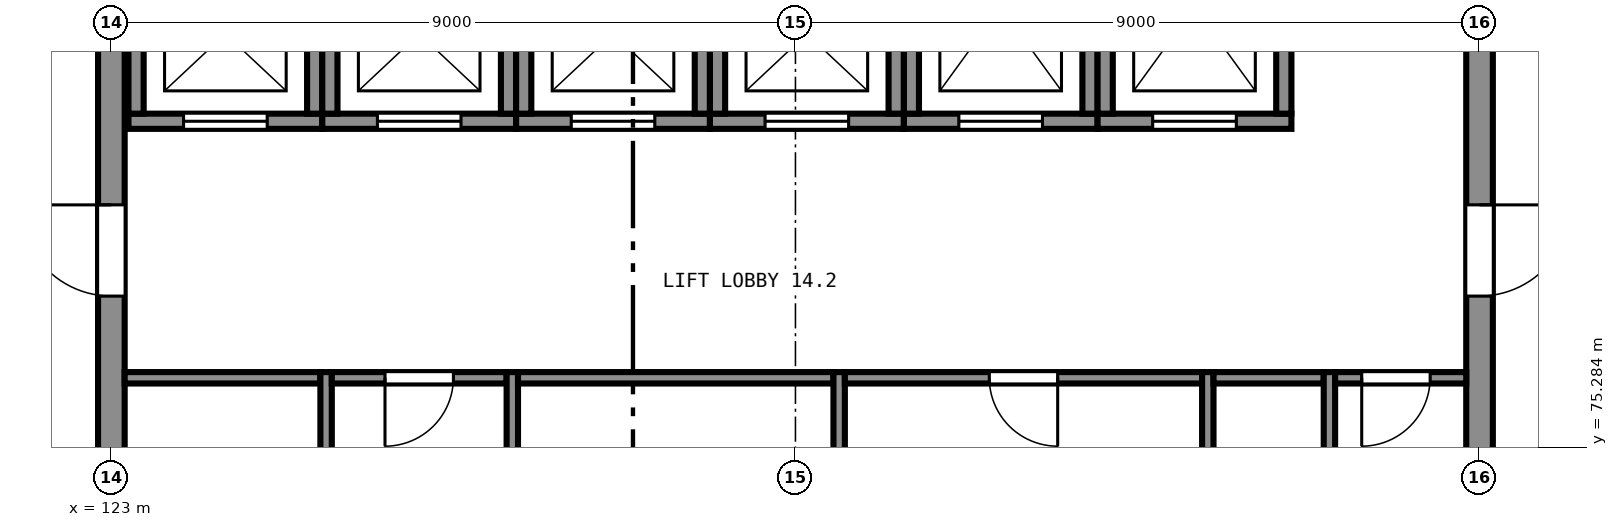
"""IFC4 building model, lengths in metres.
Left out: names, types, materials, properties, quantities, classifications, styles, units other than length and angle.
Written with IfcOpenShell. Run it as: python <this file> out.ifc"""

import sys

from ifc_helpers import new_model, si_unit, direction, frame, frame_2d, origin, place, context, subcontext, project, spatial, rectangle, extrude, element, fill, save


model = new_model("IFC4")
c1 = context("Model", 3, precision=1e-05, world=origin(), true_north=direction((0.0, 1.0)))
c2 = subcontext(c1, "Body", "Model", "MODEL_VIEW")
j1 = project(units=[si_unit("LENGTHUNIT", "METRE"), si_unit("PLANEANGLEUNIT", "RADIAN")], contexts=[c1])
p1 = place(None, origin())
s1 = spatial("IfcSite", under=j1, at=p1, CompositionType="ELEMENT")
p2 = place(p1, origin())
s2 = spatial("IfcBuilding", under=s1, at=p2, CompositionType="ELEMENT")
p3 = place(p2, frame((0.0, 0.0, 57.5)))
s3 = spatial("IfcBuildingStorey", under=s2, at=p3, CompositionType="ELEMENT", Elevation=57.5)
p4 = place(p3, frame((141.0, 65.175, 0.0), z_axis=(0.0, 0.0, 1.0), x_axis=(0.0, 1.0, 0.0)))
e1 = element("IfcWall", 1, at=p4, inside=s3, PredefinedType="SHEAR", context=c2, shape_type="SweptSolid", body=[
    extrude(rectangle(XDim=17.65, YDim=0.35, at=frame_2d((8.825, 0.0))), origin(), (0.0, 0.0, 1.0), 4.0),
])
p5 = place(p4, frame((4.35, 0.0, 0.0)))
e2 = element("IfcOpeningElement", 2, at=p5, cuts=e1, PredefinedType="OPENING", context=c2, shape_type="SweptSolid", body=[
    extrude(rectangle(XDim=1.2, YDim=2.1, at=frame_2d((0.6, 1.05))), frame((0.0, 0.185, 0.0), z_axis=(0.0, -1.0, 0.0), x_axis=(1.0, 0.0, 0.0)), (0.0, 0.0, 1.0), 0.37),
])
p6 = place(p4, frame((12.1, 0.0, 0.0)))
e3 = element("IfcOpeningElement", 3, at=p6, cuts=e1, PredefinedType="OPENING", context=c2, shape_type="SweptSolid", body=[
    extrude(rectangle(XDim=1.2, YDim=2.1, at=frame_2d((0.6, 1.05))), frame((0.0, 0.185, 0.0), z_axis=(0.0, -1.0, 0.0), x_axis=(1.0, 0.0, 0.0)), (0.0, 0.0, 1.0), 0.37),
])
p7 = place(p3, frame((123.0, 82.825, 0.0), z_axis=(0.0, 0.0, 1.0), x_axis=(0.0, -1.0, 0.0)))
e4 = element("IfcWall", 4, at=p7, inside=s3, PredefinedType="SHEAR", context=c2, shape_type="SweptSolid", body=[
    extrude(rectangle(XDim=17.65, YDim=0.35, at=frame_2d((8.825, 0.0))), origin(), (0.0, 0.0, 1.0), 4.0),
])
p8 = place(p7, frame((12.1, 0.0, 0.0)))
e5 = element("IfcOpeningElement", 5, at=p8, cuts=e4, PredefinedType="OPENING", context=c2, shape_type="SweptSolid", body=[
    extrude(rectangle(XDim=1.2, YDim=2.1, at=frame_2d((0.6, 1.05))), frame((0.0, 0.185, 0.0), z_axis=(0.0, -1.0, 0.0), x_axis=(1.0, 0.0, 0.0)), (0.0, 0.0, 1.0), 0.37),
])
p9 = place(p7, frame((4.35, 0.0, 0.0)))
e6 = element("IfcOpeningElement", 6, at=p9, cuts=e4, PredefinedType="OPENING", context=c2, shape_type="SweptSolid", body=[
    extrude(rectangle(XDim=1.2, YDim=2.1, at=frame_2d((0.6, 1.05))), frame((0.0, 0.185, 0.0), z_axis=(0.0, -1.0, 0.0), x_axis=(1.0, 0.0, 0.0)), (0.0, 0.0, 1.0), 0.37),
])
p10 = place(p3, frame((123.225, 79.575, 0.0), z_axis=(0.0, 0.0, 1.0), x_axis=(1.0, 0.0, 0.0)))
e7 = element("IfcWall", 7, at=p10, inside=s3, PredefinedType="SHEAR", context=c2, shape_type="SweptSolid", body=[
    extrude(rectangle(XDim=2.55, YDim=0.2, at=frame_2d((1.275, 0.0))), origin(), (0.0, 0.0, 1.0), 4.0),
])
p11 = place(p10, frame((0.725, 0.0, 0.0)))
e8 = element("IfcOpeningElement", 8, at=p11, cuts=e7, PredefinedType="OPENING", context=c2, shape_type="SweptSolid", body=[
    extrude(rectangle(XDim=1.1, YDim=2.1, at=frame_2d((0.55, 1.05))), frame((0.0, 0.11, 0.0), z_axis=(0.0, -1.0, 0.0), x_axis=(1.0, 0.0, 0.0)), (0.0, 0.0, 1.0), 0.22),
])
for number, where, z_axis, x_axis in (
    (9, (125.675, 79.675, 0.0), (0.0, 0.0, 1.0), (0.0, 1.0, 0.0)),
    (10, (123.325, 81.775, 0.0), (0.0, 0.0, 1.0), (0.0, -1.0, 0.0)),
):
    element("IfcWall", number, at=place(p3, frame(where, z_axis=z_axis, x_axis=x_axis)), inside=s3, PredefinedType="SHEAR", context=c2, shape_type="SweptSolid", body=[
        extrude(rectangle(XDim=2.1, YDim=0.2, at=frame_2d((1.05, 0.0))), origin(), (0.0, 0.0, 1.0), 4.0),
    ])
p12 = place(p3, frame((125.775, 79.575, 0.0), z_axis=(0.0, 0.0, 1.0), x_axis=(1.0, 0.0, 0.0)))
e11 = element("IfcWall", 11, at=p12, inside=s3, PredefinedType="SHEAR", context=c2, shape_type="SweptSolid", body=[
    extrude(rectangle(XDim=2.55, YDim=0.2, at=frame_2d((1.275, 0.0))), origin(), (0.0, 0.0, 1.0), 4.0),
])
p13 = place(p12, frame((0.725, 0.0, 0.0)))
e12 = element("IfcOpeningElement", 12, at=p13, cuts=e11, PredefinedType="OPENING", context=c2, shape_type="SweptSolid", body=[
    extrude(rectangle(XDim=1.1, YDim=2.1, at=frame_2d((0.55, 1.05))), frame((0.0, 0.11, 0.0), z_axis=(0.0, -1.0, 0.0), x_axis=(1.0, 0.0, 0.0)), (0.0, 0.0, 1.0), 0.22),
])
for number, where, z_axis, x_axis in (
    (13, (128.225, 79.675, 0.0), (0.0, 0.0, 1.0), (0.0, 1.0, 0.0)),
    (14, (125.875, 81.775, 0.0), (0.0, 0.0, 1.0), (0.0, -1.0, 0.0)),
):
    element("IfcWall", number, at=place(p3, frame(where, z_axis=z_axis, x_axis=x_axis)), inside=s3, PredefinedType="SHEAR", context=c2, shape_type="SweptSolid", body=[
        extrude(rectangle(XDim=2.1, YDim=0.2, at=frame_2d((1.05, 0.0))), origin(), (0.0, 0.0, 1.0), 4.0),
    ])
p14 = place(p3, frame((128.325, 79.575, 0.0), z_axis=(0.0, 0.0, 1.0), x_axis=(1.0, 0.0, 0.0)))
e15 = element("IfcWall", 15, at=p14, inside=s3, PredefinedType="SHEAR", context=c2, shape_type="SweptSolid", body=[
    extrude(rectangle(XDim=2.55, YDim=0.2, at=frame_2d((1.275, 0.0))), origin(), (0.0, 0.0, 1.0), 4.0),
])
p15 = place(p14, frame((0.725, 0.0, 0.0)))
e16 = element("IfcOpeningElement", 16, at=p15, cuts=e15, PredefinedType="OPENING", context=c2, shape_type="SweptSolid", body=[
    extrude(rectangle(XDim=1.1, YDim=2.1, at=frame_2d((0.55, 1.05))), frame((0.0, 0.11, 0.0), z_axis=(0.0, -1.0, 0.0), x_axis=(1.0, 0.0, 0.0)), (0.0, 0.0, 1.0), 0.22),
])
for number, where, z_axis, x_axis in (
    (17, (130.775, 79.675, 0.0), (0.0, 0.0, 1.0), (0.0, 1.0, 0.0)),
    (18, (128.425, 81.775, 0.0), (0.0, 0.0, 1.0), (0.0, -1.0, 0.0)),
):
    element("IfcWall", number, at=place(p3, frame(where, z_axis=z_axis, x_axis=x_axis)), inside=s3, PredefinedType="SHEAR", context=c2, shape_type="SweptSolid", body=[
        extrude(rectangle(XDim=2.1, YDim=0.2, at=frame_2d((1.05, 0.0))), origin(), (0.0, 0.0, 1.0), 4.0),
    ])
p16 = place(p3, frame((130.875, 79.575, 0.0), z_axis=(0.0, 0.0, 1.0), x_axis=(1.0, 0.0, 0.0)))
e19 = element("IfcWall", 19, at=p16, inside=s3, PredefinedType="SHEAR", context=c2, shape_type="SweptSolid", body=[
    extrude(rectangle(XDim=2.55, YDim=0.2, at=frame_2d((1.275, 0.0))), origin(), (0.0, 0.0, 1.0), 4.0),
])
p17 = place(p16, frame((0.725, 0.0, 0.0)))
e20 = element("IfcOpeningElement", 20, at=p17, cuts=e19, PredefinedType="OPENING", context=c2, shape_type="SweptSolid", body=[
    extrude(rectangle(XDim=1.1, YDim=2.1, at=frame_2d((0.55, 1.05))), frame((0.0, 0.11, 0.0), z_axis=(0.0, -1.0, 0.0), x_axis=(1.0, 0.0, 0.0)), (0.0, 0.0, 1.0), 0.22),
])
for number, where, z_axis, x_axis in (
    (21, (133.325, 79.675, 0.0), (0.0, 0.0, 1.0), (0.0, 1.0, 0.0)),
    (22, (130.975, 81.775, 0.0), (0.0, 0.0, 1.0), (0.0, -1.0, 0.0)),
):
    element("IfcWall", number, at=place(p3, frame(where, z_axis=z_axis, x_axis=x_axis)), inside=s3, PredefinedType="SHEAR", context=c2, shape_type="SweptSolid", body=[
        extrude(rectangle(XDim=2.1, YDim=0.2, at=frame_2d((1.05, 0.0))), origin(), (0.0, 0.0, 1.0), 4.0),
    ])
p18 = place(p3, frame((133.425, 79.575, 0.0), z_axis=(0.0, 0.0, 1.0), x_axis=(1.0, 0.0, 0.0)))
e23 = element("IfcWall", 23, at=p18, inside=s3, PredefinedType="SHEAR", context=c2, shape_type="SweptSolid", body=[
    extrude(rectangle(XDim=2.55, YDim=0.2, at=frame_2d((1.275, 0.0))), origin(), (0.0, 0.0, 1.0), 4.0),
])
p19 = place(p18, frame((0.725, 0.0, 0.0)))
e24 = element("IfcOpeningElement", 24, at=p19, cuts=e23, PredefinedType="OPENING", context=c2, shape_type="SweptSolid", body=[
    extrude(rectangle(XDim=1.1, YDim=2.1, at=frame_2d((0.55, 1.05))), frame((0.0, 0.11, 0.0), z_axis=(0.0, -1.0, 0.0), x_axis=(1.0, 0.0, 0.0)), (0.0, 0.0, 1.0), 0.22),
])
for number, where, z_axis, x_axis in (
    (25, (135.875, 79.675, 0.0), (0.0, 0.0, 1.0), (0.0, 1.0, 0.0)),
    (26, (133.525, 82.475, 0.0), (0.0, 0.0, 1.0), (0.0, -1.0, 0.0)),
):
    element("IfcWall", number, at=place(p3, frame(where, z_axis=z_axis, x_axis=x_axis)), inside=s3, PredefinedType="SHEAR", context=c2, shape_type="SweptSolid", body=[
        extrude(rectangle(XDim=2.8, YDim=0.2, at=frame_2d((1.4, 0.0))), origin(), (0.0, 0.0, 1.0), 4.0),
    ])
p20 = place(p3, frame((135.975, 79.575, 0.0), z_axis=(0.0, 0.0, 1.0), x_axis=(1.0, 0.0, 0.0)))
e27 = element("IfcWall", 27, at=p20, inside=s3, PredefinedType="SHEAR", context=c2, shape_type="SweptSolid", body=[
    extrude(rectangle(XDim=2.55, YDim=0.2, at=frame_2d((1.275, 0.0))), origin(), (0.0, 0.0, 1.0), 4.0),
])
p21 = place(p20, frame((0.725, 0.0, 0.0)))
e28 = element("IfcOpeningElement", 28, at=p21, cuts=e27, PredefinedType="OPENING", context=c2, shape_type="SweptSolid", body=[
    extrude(rectangle(XDim=1.1, YDim=2.1, at=frame_2d((0.55, 1.05))), frame((0.0, 0.11, 0.0), z_axis=(0.0, -1.0, 0.0), x_axis=(1.0, 0.0, 0.0)), (0.0, 0.0, 1.0), 0.22),
])
for number, where, z_axis, x_axis in (
    (29, (138.425, 79.675, 0.0), (0.0, 0.0, 1.0), (0.0, 1.0, 0.0)),
    (30, (136.075, 82.475, 0.0), (0.0, 0.0, 1.0), (0.0, -1.0, 0.0)),
):
    element("IfcWall", number, at=place(p3, frame(where, z_axis=z_axis, x_axis=x_axis)), inside=s3, PredefinedType="SHEAR", context=c2, shape_type="SweptSolid", body=[
        extrude(rectangle(XDim=2.8, YDim=0.2, at=frame_2d((1.4, 0.0))), origin(), (0.0, 0.0, 1.0), 4.0),
    ])
p22 = place(p3, frame((125.825, 71.725, 0.0), z_axis=(0.0, 0.0, 1.0), x_axis=(0.0, 1.0, 0.0)))
e31 = element("IfcWall", 31, at=p22, inside=s3, PredefinedType="PARTITIONING", context=c2, shape_type="SweptSolid", body=[
    extrude(rectangle(XDim=4.55, YDim=0.15, at=frame_2d((2.275, 0.0))), origin(), (0.0, 0.0, 1.0), 3.75),
])
p23 = place(p3, frame((123.175, 76.2, 0.0), z_axis=(0.0, 0.0, 1.0), x_axis=(1.0, 0.0, 0.0)))
e32 = element("IfcWall", 32, at=p23, inside=s3, PredefinedType="PARTITIONING", context=c2, shape_type="SweptSolid", body=[
    extrude(rectangle(XDim=2.575, YDim=0.15, at=frame_2d((1.288, 0.0))), origin(), (0.0, 0.0, 1.0), 3.75),
])
p24 = place(p3, frame((128.275, 71.725, 0.0), z_axis=(0.0, 0.0, 1.0), x_axis=(0.0, 1.0, 0.0)))
e33 = element("IfcWall", 33, at=p24, inside=s3, PredefinedType="PARTITIONING", context=c2, shape_type="SweptSolid", body=[
    extrude(rectangle(XDim=4.55, YDim=0.15, at=frame_2d((2.275, 0.0))), origin(), (0.0, 0.0, 1.0), 3.75),
])
p25 = place(p3, frame((125.9, 76.2, 0.0), z_axis=(0.0, 0.0, 1.0), x_axis=(1.0, 0.0, 0.0)))
e34 = element("IfcWall", 34, at=p25, inside=s3, PredefinedType="PARTITIONING", context=c2, shape_type="SweptSolid", body=[
    extrude(rectangle(XDim=2.3, YDim=0.15, at=frame_2d((1.15, 0.0))), origin(), (0.0, 0.0, 1.0), 3.75),
])
p26 = place(p25, frame((0.7, 0.0, 0.0)))
e35 = element("IfcOpeningElement", 35, at=p26, cuts=e34, PredefinedType="OPENING", context=c2, shape_type="SweptSolid", body=[
    extrude(rectangle(XDim=0.9, YDim=2.1, at=frame_2d((0.45, 1.05))), frame((0.0, 0.085, 0.0), z_axis=(0.0, -1.0, 0.0), x_axis=(1.0, 0.0, 0.0)), (0.0, 0.0, 1.0), 0.17),
])
p27 = place(p3, frame((132.575, 71.725, 0.0), z_axis=(0.0, 0.0, 1.0), x_axis=(0.0, 1.0, 0.0)))
e36 = element("IfcWall", 36, at=p27, inside=s3, PredefinedType="PARTITIONING", context=c2, shape_type="SweptSolid", body=[
    extrude(rectangle(XDim=4.55, YDim=0.15, at=frame_2d((2.275, 0.0))), origin(), (0.0, 0.0, 1.0), 3.75),
])
p28 = place(p3, frame((128.35, 76.2, 0.0), z_axis=(0.0, 0.0, 1.0), x_axis=(1.0, 0.0, 0.0)))
e37 = element("IfcWall", 37, at=p28, inside=s3, PredefinedType="PARTITIONING", context=c2, shape_type="SweptSolid", body=[
    extrude(rectangle(XDim=4.15, YDim=0.15, at=frame_2d((2.075, 0.0))), origin(), (0.0, 0.0, 1.0), 3.75),
])
p29 = place(p3, frame((137.425, 71.725, 0.0), z_axis=(0.0, 0.0, 1.0), x_axis=(0.0, 1.0, 0.0)))
e38 = element("IfcWall", 38, at=p29, inside=s3, PredefinedType="PARTITIONING", context=c2, shape_type="SweptSolid", body=[
    extrude(rectangle(XDim=4.55, YDim=0.15, at=frame_2d((2.275, 0.0))), origin(), (0.0, 0.0, 1.0), 3.75),
])
p30 = place(p3, frame((132.65, 76.2, 0.0), z_axis=(0.0, 0.0, 1.0), x_axis=(1.0, 0.0, 0.0)))
e39 = element("IfcWall", 39, at=p30, inside=s3, PredefinedType="PARTITIONING", context=c2, shape_type="SweptSolid", body=[
    extrude(rectangle(XDim=4.7, YDim=0.15, at=frame_2d((2.35, 0.0))), origin(), (0.0, 0.0, 1.0), 3.75),
])
p31 = place(p30, frame((1.9, 0.0, 0.0)))
e40 = element("IfcOpeningElement", 40, at=p31, cuts=e39, PredefinedType="OPENING", context=c2, shape_type="SweptSolid", body=[
    extrude(rectangle(XDim=0.9, YDim=2.1, at=frame_2d((0.45, 1.05))), frame((0.0, 0.085, 0.0), z_axis=(0.0, -1.0, 0.0), x_axis=(1.0, 0.0, 0.0)), (0.0, 0.0, 1.0), 0.17),
])
p32 = place(p3, frame((139.025, 71.725, 0.0), z_axis=(0.0, 0.0, 1.0), x_axis=(0.0, 1.0, 0.0)))
e41 = element("IfcWall", 41, at=p32, inside=s3, PredefinedType="PARTITIONING", context=c2, shape_type="SweptSolid", body=[
    extrude(rectangle(XDim=4.55, YDim=0.15, at=frame_2d((2.275, 0.0))), origin(), (0.0, 0.0, 1.0), 3.75),
])
p33 = place(p3, frame((137.5, 76.2, 0.0), z_axis=(0.0, 0.0, 1.0), x_axis=(1.0, 0.0, 0.0)))
e42 = element("IfcWall", 42, at=p33, inside=s3, PredefinedType="PARTITIONING", context=c2, shape_type="SweptSolid", body=[
    extrude(rectangle(XDim=1.45, YDim=0.15, at=frame_2d((0.725, 0.0))), origin(), (0.0, 0.0, 1.0), 3.75),
])
p34 = place(p3, frame((139.1, 76.2, 0.0), z_axis=(0.0, 0.0, 1.0), x_axis=(1.0, 0.0, 0.0)))
e43 = element("IfcWall", 43, at=p34, inside=s3, PredefinedType="PARTITIONING", context=c2, shape_type="SweptSolid", body=[
    extrude(rectangle(XDim=1.725, YDim=0.15, at=frame_2d((0.862, 0.0))), origin(), (0.0, 0.0, 1.0), 3.75),
])
p35 = place(p34, frame((0.35, 0.0, 0.0)))
e44 = element("IfcOpeningElement", 44, at=p35, cuts=e43, PredefinedType="OPENING", context=c2, shape_type="SweptSolid", body=[
    extrude(rectangle(XDim=0.9, YDim=2.1, at=frame_2d((0.45, 1.05))), frame((0.0, 0.085, 0.0), z_axis=(0.0, -1.0, 0.0), x_axis=(1.0, 0.0, 0.0)), (0.0, 0.0, 1.0), 0.17),
])
p36 = place(p11, origin())
e45 = element("IfcDoor", 45, at=p36, inside=s3, OperationType="SLIDING_TO_LEFT", PredefinedType="DOOR", context=c2, shape_type="SweptSolid", body=[
    extrude(rectangle(XDim=1.1, YDim=2.1, at=frame_2d((0.55, 1.05))), frame((0.0, 0.025, 0.0), z_axis=(0.0, -1.0, 0.0), x_axis=(1.0, 0.0, 0.0)), (0.0, 0.0, 1.0), 0.05),
])
fill(e8, e45)
p37 = place(p13, origin())
e46 = element("IfcDoor", 46, at=p37, inside=s3, OperationType="SLIDING_TO_LEFT", PredefinedType="DOOR", context=c2, shape_type="SweptSolid", body=[
    extrude(rectangle(XDim=1.1, YDim=2.1, at=frame_2d((0.55, 1.05))), frame((0.0, 0.025, 0.0), z_axis=(0.0, -1.0, 0.0), x_axis=(1.0, 0.0, 0.0)), (0.0, 0.0, 1.0), 0.05),
])
fill(e12, e46)
p38 = place(p15, origin())
e47 = element("IfcDoor", 47, at=p38, inside=s3, OperationType="SLIDING_TO_LEFT", PredefinedType="DOOR", context=c2, shape_type="SweptSolid", body=[
    extrude(rectangle(XDim=1.1, YDim=2.1, at=frame_2d((0.55, 1.05))), frame((0.0, 0.025, 0.0), z_axis=(0.0, -1.0, 0.0), x_axis=(1.0, 0.0, 0.0)), (0.0, 0.0, 1.0), 0.05),
])
fill(e16, e47)
p39 = place(p17, origin())
e48 = element("IfcDoor", 48, at=p39, inside=s3, OperationType="SLIDING_TO_LEFT", PredefinedType="DOOR", context=c2, shape_type="SweptSolid", body=[
    extrude(rectangle(XDim=1.1, YDim=2.1, at=frame_2d((0.55, 1.05))), frame((0.0, 0.025, 0.0), z_axis=(0.0, -1.0, 0.0), x_axis=(1.0, 0.0, 0.0)), (0.0, 0.0, 1.0), 0.05),
])
fill(e20, e48)
p40 = place(p19, origin())
e49 = element("IfcDoor", 49, at=p40, inside=s3, OperationType="SLIDING_TO_LEFT", PredefinedType="DOOR", context=c2, shape_type="SweptSolid", body=[
    extrude(rectangle(XDim=1.1, YDim=2.1, at=frame_2d((0.55, 1.05))), frame((0.0, 0.025, 0.0), z_axis=(0.0, -1.0, 0.0), x_axis=(1.0, 0.0, 0.0)), (0.0, 0.0, 1.0), 0.05),
])
fill(e24, e49)
p41 = place(p21, origin())
e50 = element("IfcDoor", 50, at=p41, inside=s3, OperationType="SLIDING_TO_LEFT", PredefinedType="DOOR", context=c2, shape_type="SweptSolid", body=[
    extrude(rectangle(XDim=1.1, YDim=2.1, at=frame_2d((0.55, 1.05))), frame((0.0, 0.025, 0.0), z_axis=(0.0, -1.0, 0.0), x_axis=(1.0, 0.0, 0.0)), (0.0, 0.0, 1.0), 0.05),
])
fill(e28, e50)
p42 = place(p9, frame((1.2, 0.0, 0.0), z_axis=(0.0, 0.0, 1.0), x_axis=(-1.0, 0.0, 0.0)))
e51 = element("IfcDoor", 51, at=p42, inside=s3, OperationType="SINGLE_SWING_LEFT", PredefinedType="DOOR", context=c2, shape_type="SweptSolid", body=[
    extrude(rectangle(XDim=1.2, YDim=2.1, at=frame_2d((0.6, 1.05))), frame((0.0, 0.025, 0.0), z_axis=(0.0, -1.0, 0.0), x_axis=(1.0, 0.0, 0.0)), (0.0, 0.0, 1.0), 0.05),
])
fill(e6, e51)
p43 = place(p6, frame((1.2, 0.0, 0.0), z_axis=(0.0, 0.0, 1.0), x_axis=(-1.0, 0.0, 0.0)))
e52 = element("IfcDoor", 52, at=p43, inside=s3, OperationType="SINGLE_SWING_RIGHT", PredefinedType="DOOR", context=c2, shape_type="SweptSolid", body=[
    extrude(rectangle(XDim=1.2, YDim=2.1, at=frame_2d((0.6, 1.05))), frame((0.0, 0.025, 0.0), z_axis=(0.0, -1.0, 0.0), x_axis=(1.0, 0.0, 0.0)), (0.0, 0.0, 1.0), 0.05),
])
fill(e3, e52)
p44 = place(p26, frame((0.9, 0.0, 0.0), z_axis=(0.0, 0.0, 1.0), x_axis=(-1.0, 0.0, 0.0)))
e53 = element("IfcDoor", 53, at=p44, inside=s3, OperationType="SINGLE_SWING_LEFT", PredefinedType="DOOR", context=c2, shape_type="SweptSolid", body=[
    extrude(rectangle(XDim=0.9, YDim=2.1, at=frame_2d((0.45, 1.05))), frame((0.0, 0.025, 0.0), z_axis=(0.0, -1.0, 0.0), x_axis=(1.0, 0.0, 0.0)), (0.0, 0.0, 1.0), 0.05),
])
fill(e35, e53)
p45 = place(p31, frame((0.9, 0.0, 0.0), z_axis=(0.0, 0.0, 1.0), x_axis=(-1.0, 0.0, 0.0)))
e54 = element("IfcDoor", 54, at=p45, inside=s3, OperationType="SINGLE_SWING_RIGHT", PredefinedType="DOOR", context=c2, shape_type="SweptSolid", body=[
    extrude(rectangle(XDim=0.9, YDim=2.1, at=frame_2d((0.45, 1.05))), frame((0.0, 0.025, 0.0), z_axis=(0.0, -1.0, 0.0), x_axis=(1.0, 0.0, 0.0)), (0.0, 0.0, 1.0), 0.05),
])
fill(e40, e54)
p46 = place(p35, frame((0.9, 0.0, 0.0), z_axis=(0.0, 0.0, 1.0), x_axis=(-1.0, 0.0, 0.0)))
e55 = element("IfcDoor", 55, at=p46, inside=s3, OperationType="SINGLE_SWING_LEFT", PredefinedType="DOOR", context=c2, shape_type="SweptSolid", body=[
    extrude(rectangle(XDim=0.9, YDim=2.1, at=frame_2d((0.45, 1.05))), frame((0.0, 0.025, 0.0), z_axis=(0.0, -1.0, 0.0), x_axis=(1.0, 0.0, 0.0)), (0.0, 0.0, 1.0), 0.05),
])
fill(e44, e55)
save(model, sys.argv[1])
